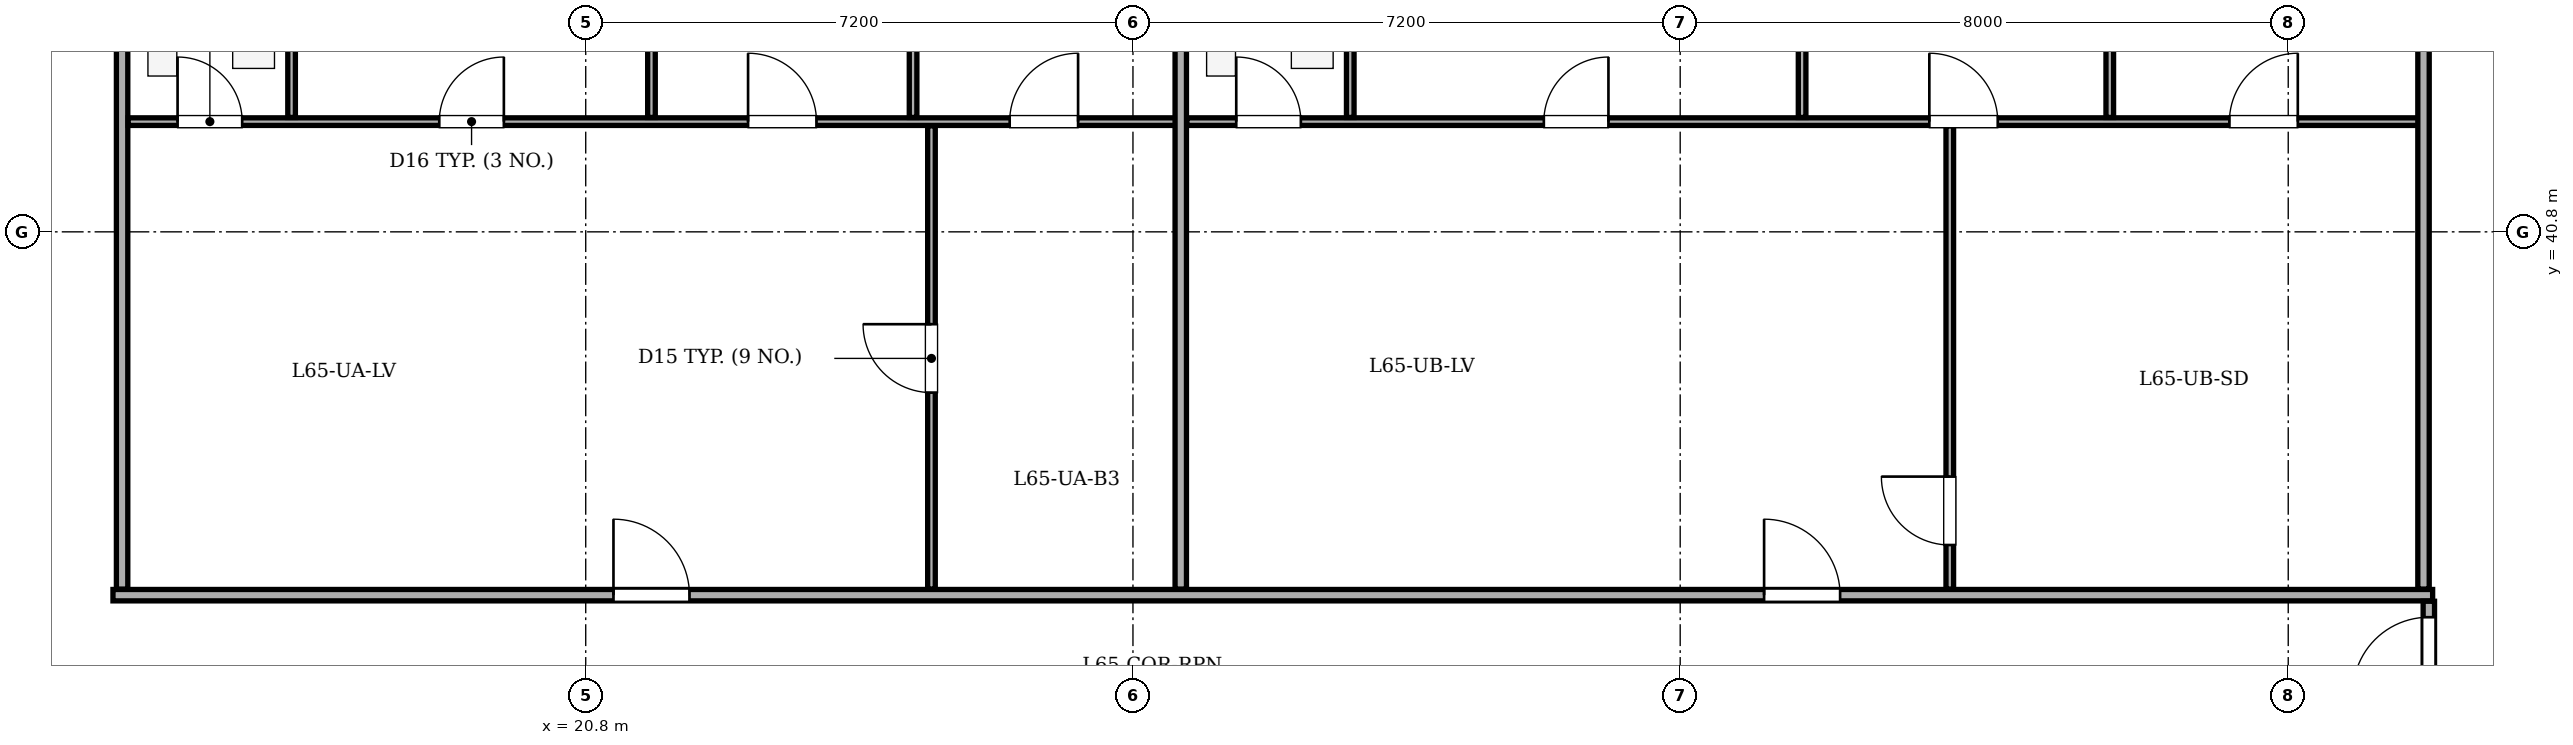
"""IFC4 building model, lengths in metres.
Left out: names, types, materials, properties, quantities, classifications, styles, units other than length and angle.
Written with IfcOpenShell. Run it as: python <this file> out.ifc"""

import sys

from ifc_helpers import new_model, si_unit, direction, frame, frame_2d, origin, place, context, subcontext, project, spatial, rectangle, extrude, element, fill, save


model = new_model("IFC4")
c1 = context("Model", 3, precision=1e-05, world=origin(), true_north=direction((0.0, 1.0)))
c2 = subcontext(c1, "Body", "Model", "MODEL_VIEW")
j1 = project(units=[si_unit("LENGTHUNIT", "METRE"), si_unit("PLANEANGLEUNIT", "RADIAN")], contexts=[c1])
p1 = place(None, origin())
s1 = spatial("IfcSite", under=j1, at=p1, CompositionType="ELEMENT")
p2 = place(p1, origin())
s2 = spatial("IfcBuilding", under=s1, at=p2, CompositionType="ELEMENT")
p3 = place(p2, frame((0.0, 0.0, 248.3)))
s3 = spatial("IfcBuildingStorey", under=s2, at=p3, CompositionType="ELEMENT", Elevation=248.3)
p4 = place(p3, frame((10.88, 41.1, 0.0), z_axis=(0.0, 0.0, 1.0), x_axis=(0.70712937715, 0.707084184501, 0.0)))
e1 = element("IfcWall", 1, at=p4, inside=s3, PredefinedType="STANDARD", context=c2, shape_type="SweptSolid", body=[
    extrude(rectangle(XDim=5.402, YDim=0.32, at=frame_2d((2.701, 0.0))), origin(), (0.0, 0.0, 1.0), 2.725),
])
p5 = place(p4, frame((2.001, 0.0, 0.75)))
e2 = element("IfcOpeningElement", 2, at=p5, cuts=e1, PredefinedType="OPENING", context=c2, shape_type="SweptSolid", body=[
    extrude(rectangle(XDim=1.4, YDim=1.65, at=frame_2d((0.7, 0.825))), frame((0.0, 0.17, 0.0), z_axis=(0.0, -1.0, 0.0), x_axis=(1.0, 0.0, 0.0)), (0.0, 0.0, 1.0), 0.34),
])
p6 = place(p3, frame((14.58, 36.02, 0.0), z_axis=(0.0, 0.0, 1.0), x_axis=(1.0, 0.0, 0.0)))
e3 = element("IfcWall", 3, at=p6, inside=s3, PredefinedType="PARTITIONING", context=c2, shape_type="SweptSolid", body=[
    extrude(rectangle(XDim=30.52, YDim=0.15, at=frame_2d((15.26, 0.0))), origin(), (0.0, 0.0, 1.0), 3.1),
])
p7 = place(p6, frame((6.585, 0.0, 0.0)))
e4 = element("IfcOpeningElement", 4, at=p7, cuts=e3, PredefinedType="OPENING", context=c2, shape_type="SweptSolid", body=[
    extrude(rectangle(XDim=1.0, YDim=2.1, at=frame_2d((0.5, 1.05))), frame((0.0, 0.085, 0.0), z_axis=(0.0, -1.0, 0.0), x_axis=(1.0, 0.0, 0.0)), (0.0, 0.0, 1.0), 0.17),
])
p8 = place(p6, frame((21.724, 0.0, 0.0)))
e5 = element("IfcOpeningElement", 5, at=p8, cuts=e3, PredefinedType="OPENING", context=c2, shape_type="SweptSolid", body=[
    extrude(rectangle(XDim=1.0, YDim=2.1, at=frame_2d((0.5, 1.05))), frame((0.0, 0.085, 0.0), z_axis=(0.0, -1.0, 0.0), x_axis=(1.0, 0.0, 0.0)), (0.0, 0.0, 1.0), 0.17),
])
p9 = place(p3, frame((14.7, 36.1, 0.0), z_axis=(0.0, 0.0, 1.0), x_axis=(0.0, 1.0, 0.0)))
e6 = element("IfcWall", 6, at=p9, inside=s3, PredefinedType="PARTITIONING", context=c2, shape_type="SweptSolid", body=[
    extrude(rectangle(XDim=8.655, YDim=0.15, at=frame_2d((4.327, 0.0))), origin(), (0.0, 0.0, 1.0), 3.1),
])
p10 = place(p3, frame((14.78, 42.25, 0.0), z_axis=(0.0, 0.0, 1.0), x_axis=(1.0, 0.0, 0.0)))
e7 = element("IfcWall", 7, at=p10, inside=s3, PredefinedType="PARTITIONING", context=c2, shape_type="SweptSolid", body=[
    extrude(rectangle(XDim=13.889, YDim=0.1, at=frame_2d((6.944, 0.0))), origin(), (0.0, 0.0, 1.0), 3.1),
])
p11 = place(p10, frame((0.65, 0.0, 0.0)))
e8 = element("IfcOpeningElement", 8, at=p11, cuts=e7, PredefinedType="OPENING", context=c2, shape_type="SweptSolid", body=[
    extrude(rectangle(XDim=0.85, YDim=2.05, at=frame_2d((0.425, 1.025))), frame((0.0, 0.06, 0.0), z_axis=(0.0, -1.0, 0.0), x_axis=(1.0, 0.0, 0.0)), (0.0, 0.0, 1.0), 0.12),
])
p12 = place(p10, frame((4.093, 0.0, 0.0)))
e9 = element("IfcOpeningElement", 9, at=p12, cuts=e7, PredefinedType="OPENING", context=c2, shape_type="SweptSolid", body=[
    extrude(rectangle(XDim=0.85, YDim=2.05, at=frame_2d((0.425, 1.025))), frame((0.0, 0.06, 0.0), z_axis=(0.0, -1.0, 0.0), x_axis=(1.0, 0.0, 0.0)), (0.0, 0.0, 1.0), 0.12),
])
p13 = place(p10, frame((8.156, 0.0, 0.0)))
e10 = element("IfcOpeningElement", 10, at=p13, cuts=e7, PredefinedType="OPENING", context=c2, shape_type="SweptSolid", body=[
    extrude(rectangle(XDim=0.9, YDim=2.05, at=frame_2d((0.45, 1.025))), frame((0.0, 0.06, 0.0), z_axis=(0.0, -1.0, 0.0), x_axis=(1.0, 0.0, 0.0)), (0.0, 0.0, 1.0), 0.12),
])
p14 = place(p10, frame((11.598, 0.0, 0.0)))
e11 = element("IfcOpeningElement", 11, at=p14, cuts=e7, PredefinedType="OPENING", context=c2, shape_type="SweptSolid", body=[
    extrude(rectangle(XDim=0.9, YDim=2.05, at=frame_2d((0.45, 1.025))), frame((0.0, 0.06, 0.0), z_axis=(0.0, -1.0, 0.0), x_axis=(1.0, 0.0, 0.0)), (0.0, 0.0, 1.0), 0.12),
])
p15 = place(p3, frame((25.349, 36.1, 0.0), z_axis=(0.0, 0.0, 1.0), x_axis=(0.0, 1.0, 0.0)))
e12 = element("IfcWall", 12, at=p15, inside=s3, PredefinedType="PARTITIONING", context=c2, shape_type="SweptSolid", body=[
    extrude(rectangle(XDim=6.095, YDim=0.1, at=frame_2d((3.047, 0.0))), origin(), (0.0, 0.0, 1.0), 3.1),
])
p16 = place(p15, frame((2.585, 0.0, 0.0)))
e13 = element("IfcOpeningElement", 13, at=p16, cuts=e12, PredefinedType="OPENING", context=c2, shape_type="SweptSolid", body=[
    extrude(rectangle(XDim=0.9, YDim=2.05, at=frame_2d((0.45, 1.025))), frame((0.0, 0.06, 0.0), z_axis=(0.0, -1.0, 0.0), x_axis=(1.0, 0.0, 0.0)), (0.0, 0.0, 1.0), 0.12),
])
for number, where, z_axis, x_axis in (
    (14, (16.93, 42.305, 0.0), (0.0, 0.0, 1.0), (0.0, 1.0, 0.0)),
    (15, (21.665, 42.305, 0.0), (0.0, 0.0, 1.0), (0.0, 1.0, 0.0)),
    (16, (25.107, 42.305, 0.0), (0.0, 0.0, 1.0), (0.0, 1.0, 0.0)),
):
    element("IfcWall", number, at=place(p3, frame(where, z_axis=z_axis, x_axis=x_axis)), inside=s3, PredefinedType="PARTITIONING", context=c2, shape_type="SweptSolid", body=[
        extrude(rectangle(XDim=2.45, YDim=0.1, at=frame_2d((1.225, 0.0))), origin(), (0.0, 0.0, 1.0), 3.1),
    ])
p17 = place(p3, frame((28.629, 36.1, 0.0), z_axis=(0.0, 0.0, 1.0), x_axis=(0.0, 1.0, 0.0)))
e17 = element("IfcWall", 17, at=p17, inside=s3, PredefinedType="PARTITIONING", context=c2, shape_type="SweptSolid", body=[
    extrude(rectangle(XDim=8.655, YDim=0.15, at=frame_2d((4.327, 0.0))), origin(), (0.0, 0.0, 1.0), 3.1),
])
p18 = place(p3, frame((28.709, 42.25, 0.0), z_axis=(0.0, 0.0, 1.0), x_axis=(1.0, 0.0, 0.0)))
e18 = element("IfcWall", 18, at=p18, inside=s3, PredefinedType="PARTITIONING", context=c2, shape_type="SweptSolid", body=[
    extrude(rectangle(XDim=16.311, YDim=0.1, at=frame_2d((8.156, 0.0))), origin(), (0.0, 0.0, 1.0), 3.1),
])
p19 = place(p18, frame((0.65, 0.0, 0.0)))
e19 = element("IfcOpeningElement", 19, at=p19, cuts=e18, PredefinedType="OPENING", context=c2, shape_type="SweptSolid", body=[
    extrude(rectangle(XDim=0.85, YDim=2.05, at=frame_2d((0.425, 1.025))), frame((0.0, 0.06, 0.0), z_axis=(0.0, -1.0, 0.0), x_axis=(1.0, 0.0, 0.0)), (0.0, 0.0, 1.0), 0.12),
])
p20 = place(p18, frame((4.697, 0.0, 0.0)))
e20 = element("IfcOpeningElement", 20, at=p20, cuts=e18, PredefinedType="OPENING", context=c2, shape_type="SweptSolid", body=[
    extrude(rectangle(XDim=0.85, YDim=2.05, at=frame_2d((0.425, 1.025))), frame((0.0, 0.06, 0.0), z_axis=(0.0, -1.0, 0.0), x_axis=(1.0, 0.0, 0.0)), (0.0, 0.0, 1.0), 0.12),
])
p21 = place(p18, frame((9.769, 0.0, 0.0)))
e21 = element("IfcOpeningElement", 21, at=p21, cuts=e18, PredefinedType="OPENING", context=c2, shape_type="SweptSolid", body=[
    extrude(rectangle(XDim=0.9, YDim=2.05, at=frame_2d((0.45, 1.025))), frame((0.0, 0.06, 0.0), z_axis=(0.0, -1.0, 0.0), x_axis=(1.0, 0.0, 0.0)), (0.0, 0.0, 1.0), 0.12),
])
p22 = place(p18, frame((13.717, 0.0, 0.0)))
e22 = element("IfcOpeningElement", 22, at=p22, cuts=e18, PredefinedType="OPENING", context=c2, shape_type="SweptSolid", body=[
    extrude(rectangle(XDim=0.9, YDim=2.05, at=frame_2d((0.45, 1.025))), frame((0.0, 0.06, 0.0), z_axis=(0.0, -1.0, 0.0), x_axis=(1.0, 0.0, 0.0)), (0.0, 0.0, 1.0), 0.12),
])
p23 = place(p3, frame((38.747, 36.1, 0.0), z_axis=(0.0, 0.0, 1.0), x_axis=(0.0, 1.0, 0.0)))
e23 = element("IfcWall", 23, at=p23, inside=s3, PredefinedType="PARTITIONING", context=c2, shape_type="SweptSolid", body=[
    extrude(rectangle(XDim=6.095, YDim=0.1, at=frame_2d((3.047, 0.0))), origin(), (0.0, 0.0, 1.0), 3.1),
])
p24 = place(p23, frame((0.58, 0.0, 0.0)))
e24 = element("IfcOpeningElement", 24, at=p24, cuts=e23, PredefinedType="OPENING", context=c2, shape_type="SweptSolid", body=[
    extrude(rectangle(XDim=0.9, YDim=2.05, at=frame_2d((0.45, 1.025))), frame((0.0, 0.06, 0.0), z_axis=(0.0, -1.0, 0.0), x_axis=(1.0, 0.0, 0.0)), (0.0, 0.0, 1.0), 0.12),
])
for number, where, z_axis, x_axis in (
    (25, (30.859, 42.305, 0.0), (0.0, 0.0, 1.0), (0.0, 1.0, 0.0)),
    (26, (36.804, 42.305, 0.0), (0.0, 0.0, 1.0), (0.0, 1.0, 0.0)),
    (27, (40.852, 42.305, 0.0), (0.0, 0.0, 1.0), (0.0, 1.0, 0.0)),
):
    element("IfcWall", number, at=place(p3, frame(where, z_axis=z_axis, x_axis=x_axis)), inside=s3, PredefinedType="PARTITIONING", context=c2, shape_type="SweptSolid", body=[
        extrude(rectangle(XDim=2.45, YDim=0.1, at=frame_2d((1.225, 0.0))), origin(), (0.0, 0.0, 1.0), 3.1),
    ])
p25 = place(p3, frame((44.98, 36.1, 0.0), z_axis=(0.0, 0.0, 1.0), x_axis=(0.0, 1.0, 0.0)))
e28 = element("IfcWall", 28, at=p25, inside=s3, PredefinedType="PARTITIONING", context=c2, shape_type="SweptSolid", body=[
    extrude(rectangle(XDim=8.655, YDim=0.15, at=frame_2d((4.327, 0.0))), origin(), (0.0, 0.0, 1.0), 2.725),
])
p26 = place(p3, frame((45.05, 34.15, 0.0), z_axis=(0.0, 0.0, 1.0), x_axis=(0.0, 1.0, 0.0)))
e29 = element("IfcWall", 29, at=p26, inside=s3, PredefinedType="PARTITIONING", context=c2, shape_type="SweptSolid", body=[
    extrude(rectangle(XDim=1.79, YDim=0.15, at=frame_2d((0.895, 0.0))), origin(), (0.0, 0.0, 1.0), 2.725),
])
p27 = place(p26, frame((0.58, 0.0, 0.0)))
e30 = element("IfcOpeningElement", 30, at=p27, cuts=e29, PredefinedType="OPENING", context=c2, shape_type="SweptSolid", body=[
    extrude(rectangle(XDim=1.0, YDim=2.1, at=frame_2d((0.5, 1.05))), frame((0.0, 0.085, 0.0), z_axis=(0.0, -1.0, 0.0), x_axis=(1.0, 0.0, 0.0)), (0.0, 0.0, 1.0), 0.17),
])
p28 = place(p7, origin())
e31 = element("IfcDoor", 31, at=p28, inside=s3, OperationType="SINGLE_SWING_LEFT", PredefinedType="DOOR", context=c2, shape_type="SweptSolid", body=[
    extrude(rectangle(XDim=1.0, YDim=2.1, at=frame_2d((0.5, 1.05))), frame((0.0, 0.025, 0.0), z_axis=(0.0, -1.0, 0.0), x_axis=(1.0, 0.0, 0.0)), (0.0, 0.0, 1.0), 0.05),
])
fill(e4, e31)
p29 = place(p8, origin())
e32 = element("IfcDoor", 32, at=p29, inside=s3, OperationType="SINGLE_SWING_LEFT", PredefinedType="DOOR", context=c2, shape_type="SweptSolid", body=[
    extrude(rectangle(XDim=1.0, YDim=2.1, at=frame_2d((0.5, 1.05))), frame((0.0, 0.025, 0.0), z_axis=(0.0, -1.0, 0.0), x_axis=(1.0, 0.0, 0.0)), (0.0, 0.0, 1.0), 0.05),
])
fill(e5, e32)
p30 = place(p16, origin())
e33 = element("IfcDoor", 33, at=p30, inside=s3, OperationType="SINGLE_SWING_RIGHT", PredefinedType="DOOR", context=c2, shape_type="SweptSolid", body=[
    extrude(rectangle(XDim=0.9, YDim=2.05, at=frame_2d((0.45, 1.025))), frame((0.0, 0.025, 0.0), z_axis=(0.0, -1.0, 0.0), x_axis=(1.0, 0.0, 0.0)), (0.0, 0.0, 1.0), 0.05),
])
fill(e13, e33)
p31 = place(p11, origin())
e34 = element("IfcDoor", 34, at=p31, inside=s3, OperationType="SINGLE_SWING_LEFT", PredefinedType="DOOR", context=c2, shape_type="SweptSolid", body=[
    extrude(rectangle(XDim=0.85, YDim=2.05, at=frame_2d((0.425, 1.025))), frame((0.0, 0.025, 0.0), z_axis=(0.0, -1.0, 0.0), x_axis=(1.0, 0.0, 0.0)), (0.0, 0.0, 1.0), 0.05),
])
fill(e8, e34)
p32 = place(p12, origin())
e35 = element("IfcDoor", 35, at=p32, inside=s3, OperationType="SINGLE_SWING_RIGHT", PredefinedType="DOOR", context=c2, shape_type="SweptSolid", body=[
    extrude(rectangle(XDim=0.85, YDim=2.05, at=frame_2d((0.425, 1.025))), frame((0.0, 0.025, 0.0), z_axis=(0.0, -1.0, 0.0), x_axis=(1.0, 0.0, 0.0)), (0.0, 0.0, 1.0), 0.05),
])
fill(e9, e35)
p33 = place(p13, origin())
e36 = element("IfcDoor", 36, at=p33, inside=s3, OperationType="SINGLE_SWING_LEFT", PredefinedType="DOOR", context=c2, shape_type="SweptSolid", body=[
    extrude(rectangle(XDim=0.9, YDim=2.05, at=frame_2d((0.45, 1.025))), frame((0.0, 0.025, 0.0), z_axis=(0.0, -1.0, 0.0), x_axis=(1.0, 0.0, 0.0)), (0.0, 0.0, 1.0), 0.05),
])
fill(e10, e36)
p34 = place(p14, origin())
e37 = element("IfcDoor", 37, at=p34, inside=s3, OperationType="SINGLE_SWING_RIGHT", PredefinedType="DOOR", context=c2, shape_type="SweptSolid", body=[
    extrude(rectangle(XDim=0.9, YDim=2.05, at=frame_2d((0.45, 1.025))), frame((0.0, 0.025, 0.0), z_axis=(0.0, -1.0, 0.0), x_axis=(1.0, 0.0, 0.0)), (0.0, 0.0, 1.0), 0.05),
])
fill(e11, e37)
p35 = place(p24, origin())
e38 = element("IfcDoor", 38, at=p35, inside=s3, OperationType="SINGLE_SWING_RIGHT", PredefinedType="DOOR", context=c2, shape_type="SweptSolid", body=[
    extrude(rectangle(XDim=0.9, YDim=2.05, at=frame_2d((0.45, 1.025))), frame((0.0, 0.025, 0.0), z_axis=(0.0, -1.0, 0.0), x_axis=(1.0, 0.0, 0.0)), (0.0, 0.0, 1.0), 0.05),
])
fill(e24, e38)
p36 = place(p19, origin())
e39 = element("IfcDoor", 39, at=p36, inside=s3, OperationType="SINGLE_SWING_LEFT", PredefinedType="DOOR", context=c2, shape_type="SweptSolid", body=[
    extrude(rectangle(XDim=0.85, YDim=2.05, at=frame_2d((0.425, 1.025))), frame((0.0, 0.025, 0.0), z_axis=(0.0, -1.0, 0.0), x_axis=(1.0, 0.0, 0.0)), (0.0, 0.0, 1.0), 0.05),
])
fill(e19, e39)
p37 = place(p20, origin())
e40 = element("IfcDoor", 40, at=p37, inside=s3, OperationType="SINGLE_SWING_RIGHT", PredefinedType="DOOR", context=c2, shape_type="SweptSolid", body=[
    extrude(rectangle(XDim=0.85, YDim=2.05, at=frame_2d((0.425, 1.025))), frame((0.0, 0.025, 0.0), z_axis=(0.0, -1.0, 0.0), x_axis=(1.0, 0.0, 0.0)), (0.0, 0.0, 1.0), 0.05),
])
fill(e20, e40)
p38 = place(p21, origin())
e41 = element("IfcDoor", 41, at=p38, inside=s3, OperationType="SINGLE_SWING_LEFT", PredefinedType="DOOR", context=c2, shape_type="SweptSolid", body=[
    extrude(rectangle(XDim=0.9, YDim=2.05, at=frame_2d((0.45, 1.025))), frame((0.0, 0.025, 0.0), z_axis=(0.0, -1.0, 0.0), x_axis=(1.0, 0.0, 0.0)), (0.0, 0.0, 1.0), 0.05),
])
fill(e21, e41)
p39 = place(p22, origin())
e42 = element("IfcDoor", 42, at=p39, inside=s3, OperationType="SINGLE_SWING_RIGHT", PredefinedType="DOOR", context=c2, shape_type="SweptSolid", body=[
    extrude(rectangle(XDim=0.9, YDim=2.05, at=frame_2d((0.45, 1.025))), frame((0.0, 0.025, 0.0), z_axis=(0.0, -1.0, 0.0), x_axis=(1.0, 0.0, 0.0)), (0.0, 0.0, 1.0), 0.05),
])
fill(e22, e42)
p40 = place(p27, origin())
e43 = element("IfcDoor", 43, at=p40, inside=s3, OperationType="SINGLE_SWING_LEFT", PredefinedType="DOOR", context=c2, shape_type="SweptSolid", body=[
    extrude(rectangle(XDim=1.0, YDim=2.1, at=frame_2d((0.5, 1.05))), frame((0.0, 0.025, 0.0), z_axis=(0.0, -1.0, 0.0), x_axis=(1.0, 0.0, 0.0)), (0.0, 0.0, 1.0), 0.05),
])
fill(e30, e43)
save(model, sys.argv[1])
